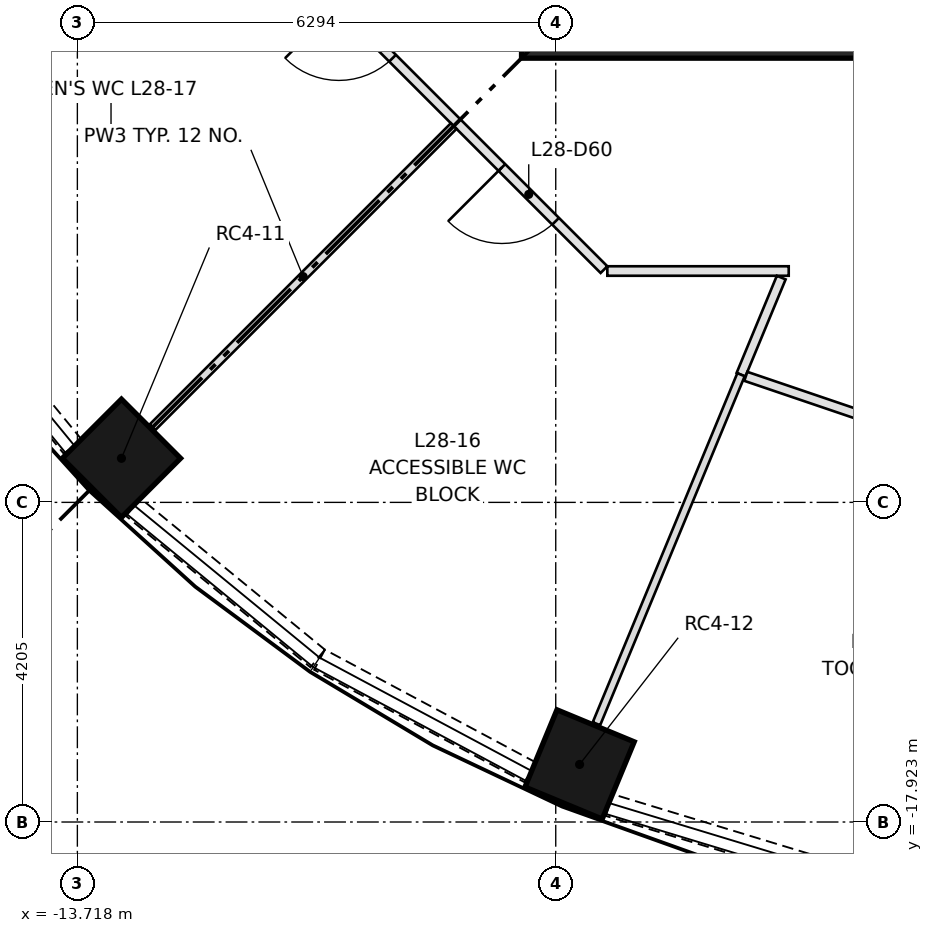
"""IFC4 building model, lengths in metres.
Left out: names, types, materials, properties, quantities, classifications, styles, units other than length and angle.
Written with IfcOpenShell. Run it as: python <this file> out.ifc"""

import sys

from ifc_helpers import new_model, si_unit, direction, frame, frame_2d, origin, origin_2d, place, context, subcontext, project, spatial, rectangle, extrude, element, fill, save


model = new_model("IFC4")
c1 = context("Model", 3, precision=1e-05, world=origin(), true_north=direction((0.0, 1.0)))
c2 = subcontext(c1, "Body", "Model", "MODEL_VIEW")
j1 = project(units=[si_unit("LENGTHUNIT", "METRE"), si_unit("PLANEANGLEUNIT", "RADIAN")], contexts=[c1])
p1 = place(None, origin())
s1 = spatial("IfcSite", under=j1, at=p1, CompositionType="ELEMENT")
p2 = place(p1, origin())
s2 = spatial("IfcBuilding", under=s1, at=p2, CompositionType="ELEMENT")
p3 = place(p2, frame((0.0, 0.0, 109.25)))
s3 = spatial("IfcBuildingStorey", under=s2, at=p3, CompositionType="ELEMENT", Elevation=109.25)
for number, where, z_axis, x_axis in (
    (1, (-13.138, -13.138, 0.0), (0.0, 0.0, 1.0), (-0.707, -0.707, 0.0)),
    (2, (-7.11, -17.166, 0.0), (0.0, 0.0, 1.0), (-0.383, -0.924, 0.0)),
):
    element("IfcColumn", number, at=place(p3, frame(where, z_axis=z_axis, x_axis=x_axis)), inside=s3, PredefinedType="COLUMN", context=c2, shape_type="SweptSolid", body=[
        extrude(rectangle(XDim=1.1, YDim=1.1, at=origin_2d()), origin(), (0.0, 0.0, 1.0), 3.65),
    ])
p4 = place(p3, frame((-7.874, -7.499, 0.0), z_axis=(0.0, 0.0, 1.0), x_axis=(1.0, 0.0, 0.0)))
e3 = element("IfcWall", 3, at=p4, inside=s3, PredefinedType="SHEAR", context=c2, shape_type="SweptSolid", body=[
    extrude(rectangle(XDim=15.748, YDim=0.75, at=frame_2d((7.874, 0.0))), origin(), (0.0, 0.0, 1.0), 3.65),
])
for number, where, z_axis, x_axis in (
    (4, (-15.771, -10.557, 0.0), (0.0, 0.0, 1.0), (0.634, -0.773, 0.0)),
    (5, (-12.983, -13.781, 0.0), (0.0, 0.0, 1.0), (0.773, -0.634, 0.0)),
):
    element("IfcWall", number, at=place(p3, frame(where, z_axis=z_axis, x_axis=x_axis)), inside=s3, PredefinedType="SOLIDWALL", context=c2, shape_type="SweptSolid", body=[
        extrude(rectangle(XDim=3.139, YDim=0.3, at=frame_2d((1.569, 0.0))), origin(), (0.0, 0.0, 1.0), 0.9),
    ])
p5 = place(p3, frame((-10.532, -15.788, 0.0), z_axis=(0.0, 0.0, 1.0), x_axis=(0.88193278355, -0.471375185282, 0.0)))
e6 = element("IfcWall", 6, at=p5, inside=s3, PredefinedType="SOLIDWALL", context=c2, shape_type="SweptSolid", body=[
    extrude(rectangle(XDim=3.139, YDim=0.3, at=frame_2d((1.57, 0.0))), origin(), (0.0, 0.0, 1.0), 0.9),
])
p6 = place(p3, frame((-6.722, -17.699, 0.0), z_axis=(0.0, 0.0, 1.0), x_axis=(0.956961595403, -0.290214584271, 0.0)))
e7 = element("IfcWall", 7, at=p6, inside=s3, PredefinedType="SOLIDWALL", context=c2, shape_type="SweptSolid", body=[
    extrude(rectangle(XDim=3.139, YDim=0.3, at=frame_2d((1.57, 0.0))), origin(), (0.0, 0.0, 1.0), 0.9),
])
p7 = place(p3, frame((-8.722, -8.722, 0.0), z_axis=(0.0, 0.0, 1.0), x_axis=(-0.707151428813, 0.707062130741, 0.0)))
e8 = element("IfcWall", 8, at=p7, inside=s3, PredefinedType="PARTITIONING", context=c2, shape_type="SweptSolid", body=[
    extrude(rectangle(XDim=2.734, YDim=0.125, at=frame_2d((1.367, 0.0))), origin(), (0.0, 0.0, 1.0), 3.3),
])
p8 = place(p7, frame((1.2, 0.0, 0.0)))
e9 = element("IfcOpeningElement", 9, at=p8, cuts=e8, PredefinedType="OPENING", context=c2, shape_type="SweptSolid", body=[
    extrude(rectangle(XDim=1.0, YDim=2.1, at=frame_2d((0.5, 1.05))), frame((0.0, 0.073, 0.0), z_axis=(0.0, -1.0, 0.0), x_axis=(1.0, 0.0, 0.0)), (0.0, 0.0, 1.0), 0.145),
])
p9 = place(p3, frame((-6.789, -10.656, 0.0), z_axis=(0.0, 0.0, 1.0), x_axis=(-0.707062130741, 0.707151428813, 0.0)))
e10 = element("IfcWall", 10, at=p9, inside=s3, PredefinedType="PARTITIONING", context=c2, shape_type="SweptSolid", body=[
    extrude(rectangle(XDim=2.734, YDim=0.125, at=frame_2d((1.367, 0.0))), origin(), (0.0, 0.0, 1.0), 3.3),
])
p10 = place(p9, frame((0.9, 0.0, 0.0)))
e11 = element("IfcOpeningElement", 11, at=p10, cuts=e10, PredefinedType="OPENING", context=c2, shape_type="SweptSolid", body=[
    extrude(rectangle(XDim=1.0, YDim=2.1, at=frame_2d((0.5, 1.05))), frame((0.0, 0.073, 0.0), z_axis=(0.0, -1.0, 0.0), x_axis=(1.0, 0.0, 0.0)), (0.0, 0.0, 1.0), 0.145),
])
p11 = place(p3, frame((-4.359, -10.674, 0.0), z_axis=(0.0, 0.0, 1.0), x_axis=(-1.0, 0.0, 0.0)))
e12 = element("IfcWall", 12, at=p11, inside=s3, PredefinedType="PARTITIONING", context=c2, shape_type="SweptSolid", body=[
    extrude(rectangle(XDim=2.386, YDim=0.125, at=frame_2d((1.193, 0.0))), origin(), (0.0, 0.0, 1.0), 3.3),
])
p12 = place(p3, frame((-12.728, -12.728, 0.0), z_axis=(0.0, 0.0, 1.0), x_axis=(0.707106781187, 0.707106781187, 0.0)))
e13 = element("IfcWall", 13, at=p12, inside=s3, PredefinedType="PARTITIONING", context=c2, shape_type="SweptSolid", body=[
    extrude(rectangle(XDim=5.602, YDim=0.105, at=frame_2d((2.801, 0.0))), origin(), (0.0, 0.0, 1.0), 3.3),
])
p13 = place(p3, frame((-4.457, -10.76, 0.0), z_axis=(0.0, 0.0, 1.0), x_axis=(-0.382746785562, -0.923853288213, 0.0)))
e14 = element("IfcWall", 14, at=p13, inside=s3, PredefinedType="PARTITIONING", context=c2, shape_type="SweptSolid", body=[
    extrude(rectangle(XDim=1.383, YDim=0.125, at=frame_2d((0.691, 0.0))), origin(), (0.0, 0.0, 1.0), 3.3),
])
p14 = place(p3, frame((-4.986, -12.038, 0.0), z_axis=(0.0, 0.0, 1.0), x_axis=(-0.38266126553, -0.923888714003, 0.0)))
e15 = element("IfcWall", 15, at=p14, inside=s3, PredefinedType="PARTITIONING", context=c2, shape_type="SweptSolid", body=[
    extrude(rectangle(XDim=4.97, YDim=0.105, at=frame_2d((2.485, 0.0))), origin(), (0.0, 0.0, 1.0), 3.3),
])
p15 = place(p3, frame((-3.376, -12.585, 0.0), z_axis=(0.0, 0.0, 1.0), x_axis=(-0.946920220616, 0.321468654442, 0.0)))
e16 = element("IfcWall", 16, at=p15, inside=s3, PredefinedType="PARTITIONING", context=c2, shape_type="SweptSolid", body=[
    extrude(rectangle(XDim=1.634, YDim=0.125, at=frame_2d((0.817, 0.0))), origin(), (0.0, 0.0, 1.0), 3.3),
])
p16 = place(p8, origin())
e17 = element("IfcDoor", 17, at=p16, inside=s3, OperationType="SINGLE_SWING_RIGHT", PredefinedType="DOOR", context=c2, shape_type="SweptSolid", body=[
    extrude(rectangle(XDim=1.0, YDim=2.1, at=frame_2d((0.5, 1.05))), frame((0.0, 0.025, 0.0), z_axis=(0.0, -1.0, 0.0), x_axis=(1.0, 0.0, 0.0)), (0.0, 0.0, 1.0), 0.05),
])
fill(e9, e17)
p17 = place(p10, origin())
e18 = element("IfcDoor", 18, at=p17, inside=s3, OperationType="SINGLE_SWING_RIGHT", PredefinedType="DOOR", context=c2, shape_type="SweptSolid", body=[
    extrude(rectangle(XDim=1.0, YDim=2.1, at=frame_2d((0.5, 1.05))), frame((0.0, 0.025, 0.0), z_axis=(0.0, -1.0, 0.0), x_axis=(1.0, 0.0, 0.0)), (0.0, 0.0, 1.0), 0.05),
])
fill(e11, e18)
save(model, sys.argv[1])
